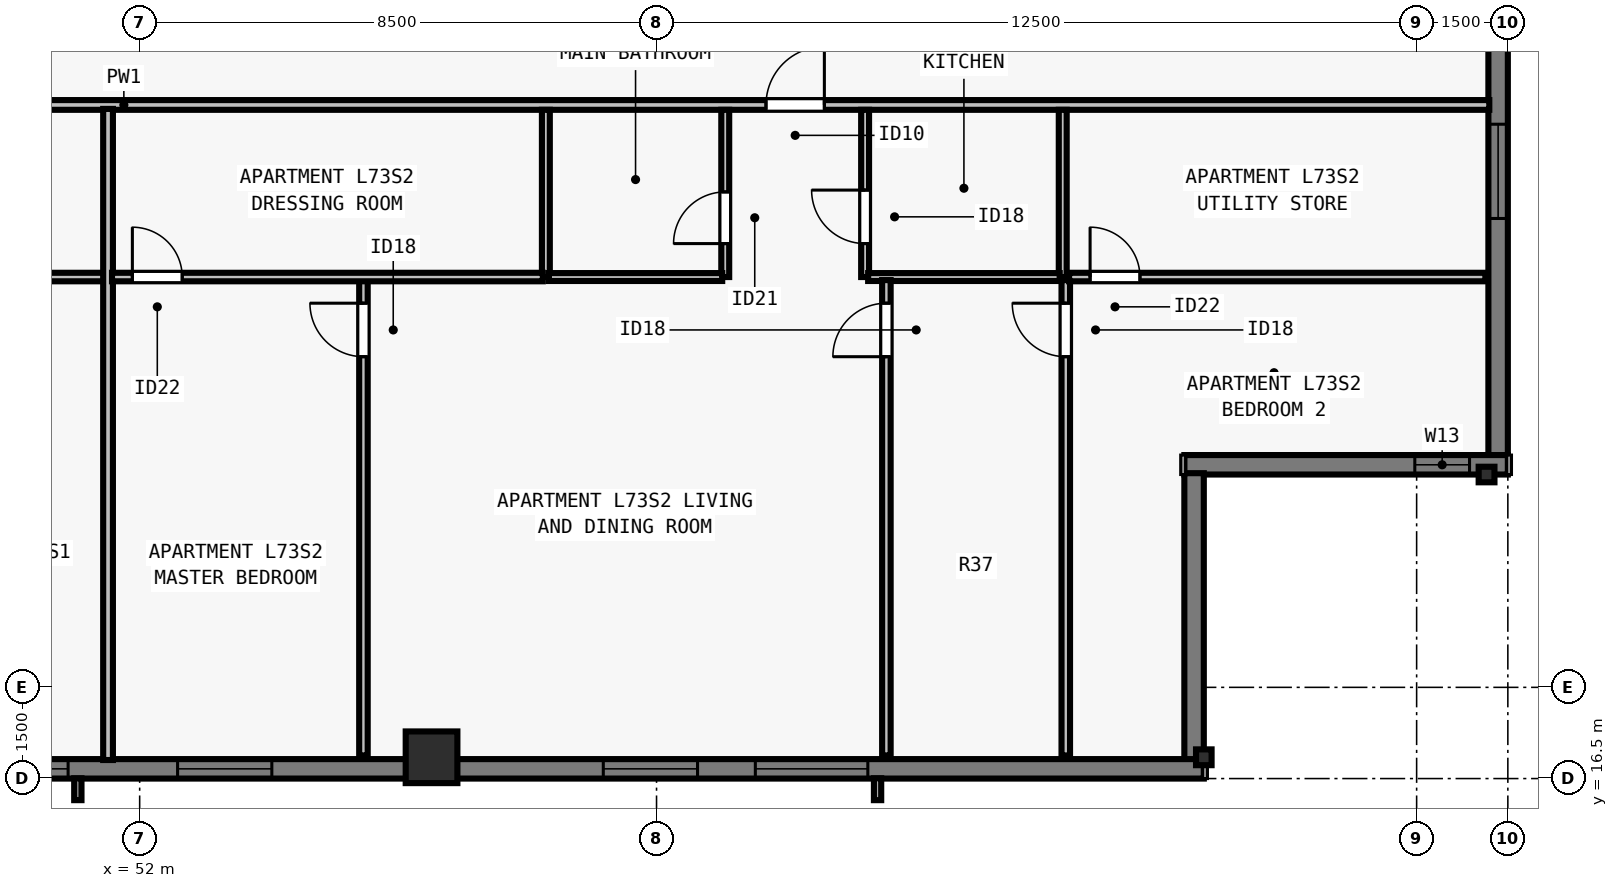
"""IFC4 building model, lengths in metres.
Left out: names, types, materials, properties, quantities, classifications, styles, units other than length and angle.
Written with IfcOpenShell. Run it as: python <this file> out.ifc"""

import sys

from ifc_helpers import new_model, si_unit, direction, frame, frame_2d, origin, origin_2d, place, context, subcontext, project, spatial, rectangle, i_section, extrude, element, fill, save


model = new_model("IFC4")
c1 = context("Model", 3, precision=1e-05, world=origin(), true_north=direction((0.0, 1.0)))
c2 = subcontext(c1, "Body", "Model", "MODEL_VIEW")
j1 = project(units=[si_unit("LENGTHUNIT", "METRE"), si_unit("PLANEANGLEUNIT", "RADIAN")], contexts=[c1])
p1 = place(None, origin())
s1 = spatial("IfcSite", under=j1, at=p1, CompositionType="ELEMENT")
p2 = place(p1, origin())
s2 = spatial("IfcBuilding", under=s1, at=p2, CompositionType="ELEMENT")
p3 = place(p2, frame((0.0, 0.0, 265.5)))
s3 = spatial("IfcBuildingStorey", under=s2, at=p3, CompositionType="ELEMENT", Elevation=265.5)
p4 = place(p3, frame((56.8, 16.85, 0.0), z_axis=(0.0, 0.0, 1.0), x_axis=(1.0, 0.0, 0.0)))
e1 = element("IfcColumn", 1, at=p4, inside=s3, PredefinedType="COLUMN", context=c2, shape_type="SweptSolid", body=[
    extrude(rectangle(XDim=0.85, YDim=0.85, at=origin_2d()), origin(), (0.0, 0.0, 1.0), 3.5),
])
for number, where, z_axis, x_axis in (
    (2, (69.5, 16.85, 0.0), (0.0, 0.0, 1.0), (1.0, 0.0, 0.0)),
    (3, (74.15, 21.5, 0.0), (0.0, 0.0, 1.0), (0.0, 1.0, 0.0)),
):
    element("IfcColumn", number, at=place(p3, frame(where, z_axis=z_axis, x_axis=x_axis)), inside=s3, PredefinedType="COLUMN", context=c2, shape_type="SweptSolid", body=[
        extrude(i_section(OverallWidth=0.256, OverallDepth=0.26, WebThickness=0.01, FlangeThickness=0.017, FilletRadius=0.013, at=origin_2d()), origin(), (0.0, 0.0, 1.0), 3.5),
    ])
p5 = place(p3, frame((74.34, 56.5, 0.0), z_axis=(0.0, 0.0, 1.0), x_axis=(0.0, -1.0, 0.0)))
e4 = element("IfcWall", 4, at=p5, inside=s3, PredefinedType="SOLIDWALL", context=c2, shape_type="SweptSolid", body=[
    extrude(rectangle(XDim=34.702, YDim=0.32, at=frame_2d((17.351, 0.0))), origin(), (0.0, 0.0, 1.0), 3.29),
])
p6 = place(p5, frame((6.888, 0.0, 0.8)))
e5 = element("IfcOpeningElement", 5, at=p6, cuts=e4, PredefinedType="OPENING", context=c2, shape_type="SweptSolid", body=[
    extrude(rectangle(XDim=1.55, YDim=1.678, at=frame_2d((0.775, 0.839))), frame((0.0, 0.17, 0.0), z_axis=(0.0, -1.0, 0.0), x_axis=(1.0, 0.0, 0.0)), (0.0, 0.0, 1.0), 0.34),
])
p7 = place(p5, frame((10.113, 0.0, 0.8)))
e6 = element("IfcOpeningElement", 6, at=p7, cuts=e4, PredefinedType="OPENING", context=c2, shape_type="SweptSolid", body=[
    extrude(rectangle(XDim=1.85, YDim=1.678, at=frame_2d((0.925, 0.839))), frame((0.0, 0.17, 0.0), z_axis=(0.0, -1.0, 0.0), x_axis=(1.0, 0.0, 0.0)), (0.0, 0.0, 1.0), 0.34),
])
p8 = place(p5, frame((14.038, 0.0, 0.8)))
e7 = element("IfcOpeningElement", 7, at=p8, cuts=e4, PredefinedType="OPENING", context=c2, shape_type="SweptSolid", body=[
    extrude(rectangle(XDim=1.55, YDim=1.678, at=frame_2d((0.775, 0.839))), frame((0.0, 0.17, 0.0), z_axis=(0.0, -1.0, 0.0), x_axis=(1.0, 0.0, 0.0)), (0.0, 0.0, 1.0), 0.34),
])
p9 = place(p5, frame((18.114, 0.0, 0.8)))
e8 = element("IfcOpeningElement", 8, at=p9, cuts=e4, PredefinedType="OPENING", context=c2, shape_type="SweptSolid", body=[
    extrude(rectangle(XDim=1.85, YDim=1.678, at=frame_2d((0.925, 0.839))), frame((0.0, 0.17, 0.0), z_axis=(0.0, -1.0, 0.0), x_axis=(1.0, 0.0, 0.0)), (0.0, 0.0, 1.0), 0.34),
])
p10 = place(p5, frame((23.614, 0.0, 0.8)))
e9 = element("IfcOpeningElement", 9, at=p10, cuts=e4, PredefinedType="OPENING", context=c2, shape_type="SweptSolid", body=[
    extrude(rectangle(XDim=1.85, YDim=1.678, at=frame_2d((0.925, 0.839))), frame((0.0, 0.17, 0.0), z_axis=(0.0, -1.0, 0.0), x_axis=(1.0, 0.0, 0.0)), (0.0, 0.0, 1.0), 0.34),
])
p11 = place(p5, frame((29.24, 0.0, 0.8)))
e10 = element("IfcOpeningElement", 10, at=p11, cuts=e4, PredefinedType="OPENING", context=c2, shape_type="SweptSolid", body=[
    extrude(rectangle(XDim=1.55, YDim=1.678, at=frame_2d((0.775, 0.839))), frame((0.0, 0.17, 0.0), z_axis=(0.0, -1.0, 0.0), x_axis=(1.0, 0.0, 0.0)), (0.0, 0.0, 1.0), 0.34),
])
p12 = place(p3, frame((74.5, 21.66, 0.0), z_axis=(0.0, 0.0, 1.0), x_axis=(-1.0, 0.0, 0.0)))
e11 = element("IfcWall", 11, at=p12, inside=s3, PredefinedType="SOLIDWALL", context=c2, shape_type="SweptSolid", body=[
    extrude(rectangle(XDim=5.32, YDim=0.32, at=frame_2d((2.66, 0.0))), origin(), (0.0, 0.0, 1.0), 3.29),
])
p13 = place(p12, frame((0.63, 0.0, 0.8)))
e12 = element("IfcOpeningElement", 12, at=p13, cuts=e11, PredefinedType="OPENING", context=c2, shape_type="SweptSolid", body=[
    extrude(rectangle(XDim=0.9, YDim=1.678, at=frame_2d((0.45, 0.839))), frame((0.0, 0.17, 0.0), z_axis=(0.0, -1.0, 0.0), x_axis=(1.0, 0.0, 0.0)), (0.0, 0.0, 1.0), 0.34),
])
p14 = place(p3, frame((69.34, 21.522, 0.0), z_axis=(0.0, 0.0, 1.0), x_axis=(0.0, -1.0, 0.0)))
e13 = element("IfcWall", 13, at=p14, inside=s3, PredefinedType="SOLIDWALL", context=c2, shape_type="SweptSolid", body=[
    extrude(rectangle(XDim=4.724, YDim=0.32, at=frame_2d((2.362, 0.0))), origin(), (0.0, 0.0, 1.0), 3.29),
])
p15 = place(p3, frame((69.5, 16.66, 0.0), z_axis=(0.0, 0.0, 1.0), x_axis=(-1.0, 0.0, 0.0)))
e14 = element("IfcWall", 14, at=p15, inside=s3, PredefinedType="SOLIDWALL", context=c2, shape_type="SweptSolid", body=[
    extrude(rectangle(XDim=22.602, YDim=0.32, at=frame_2d((11.301, 0.0))), origin(), (0.0, 0.0, 1.0), 3.29),
])
p16 = place(p15, frame((5.525, 0.0, 0.8)))
e15 = element("IfcOpeningElement", 15, at=p16, cuts=e14, PredefinedType="OPENING", context=c2, shape_type="SweptSolid", body=[
    extrude(rectangle(XDim=1.85, YDim=1.678, at=frame_2d((0.925, 0.839))), frame((0.0, 0.17, 0.0), z_axis=(0.0, -1.0, 0.0), x_axis=(1.0, 0.0, 0.0)), (0.0, 0.0, 1.0), 0.34),
])
p17 = place(p15, frame((8.326, 0.0, 0.8)))
e16 = element("IfcOpeningElement", 16, at=p17, cuts=e14, PredefinedType="OPENING", context=c2, shape_type="SweptSolid", body=[
    extrude(rectangle(XDim=1.55, YDim=1.678, at=frame_2d((0.775, 0.839))), frame((0.0, 0.17, 0.0), z_axis=(0.0, -1.0, 0.0), x_axis=(1.0, 0.0, 0.0)), (0.0, 0.0, 1.0), 0.34),
])
p18 = place(p15, frame((15.326, 0.0, 0.8)))
e17 = element("IfcOpeningElement", 17, at=p18, cuts=e14, PredefinedType="OPENING", context=c2, shape_type="SweptSolid", body=[
    extrude(rectangle(XDim=1.55, YDim=1.678, at=frame_2d((0.775, 0.839))), frame((0.0, 0.17, 0.0), z_axis=(0.0, -1.0, 0.0), x_axis=(1.0, 0.0, 0.0)), (0.0, 0.0, 1.0), 0.34),
])
p19 = place(p15, frame((18.677, 0.0, 0.8)))
e18 = element("IfcOpeningElement", 18, at=p19, cuts=e14, PredefinedType="OPENING", context=c2, shape_type="SweptSolid", body=[
    extrude(rectangle(XDim=1.85, YDim=1.678, at=frame_2d((0.925, 0.839))), frame((0.0, 0.17, 0.0), z_axis=(0.0, -1.0, 0.0), x_axis=(1.0, 0.0, 0.0)), (0.0, 0.0, 1.0), 0.34),
])
p20 = place(p3, frame((29.805, 27.577, 0.0), z_axis=(0.0, 0.0, 1.0), x_axis=(1.0, 0.0, 0.0)))
e19 = element("IfcWall", 19, at=p20, inside=s3, PredefinedType="PARTITIONING", context=c2, shape_type="SweptSolid", body=[
    extrude(rectangle(XDim=44.39, YDim=0.16, at=frame_2d((22.195, 0.0))), origin(), (0.0, 0.0, 1.0), 2.958),
])
p21 = place(p20, frame((10.415, 0.0, 0.0)))
e20 = element("IfcOpeningElement", 20, at=p21, cuts=e19, PredefinedType="OPENING", context=c2, shape_type="SweptSolid", body=[
    extrude(rectangle(XDim=0.96, YDim=2.18, at=frame_2d((0.48, 1.09))), frame((0.0, 0.09, 0.0), z_axis=(0.0, -1.0, 0.0), x_axis=(1.0, 0.0, 0.0)), (0.0, 0.0, 1.0), 0.18),
])
p22 = place(p20, frame((32.495, 0.0, 0.0)))
e21 = element("IfcOpeningElement", 21, at=p22, cuts=e19, PredefinedType="OPENING", context=c2, shape_type="SweptSolid", body=[
    extrude(rectangle(XDim=0.96, YDim=2.18, at=frame_2d((0.48, 1.09))), frame((0.0, 0.09, 0.0), z_axis=(0.0, -1.0, 0.0), x_axis=(1.0, 0.0, 0.0)), (0.0, 0.0, 1.0), 0.18),
])
p23 = place(p3, frame((45.15, 24.748, 0.0), z_axis=(0.0, 0.0, 1.0), x_axis=(1.0, 0.0, 0.0)))
e22 = element("IfcWall", 22, at=p23, inside=s3, PredefinedType="PARTITIONING", context=c2, shape_type="SweptSolid", body=[
    extrude(rectangle(XDim=6.38, YDim=0.14, at=frame_2d((3.19, 0.0))), origin(), (0.0, 0.0, 1.0), 3.29),
])
p24 = place(p23, frame((0.4, 0.0, 0.0)))
e23 = element("IfcOpeningElement", 23, at=p24, cuts=e22, PredefinedType="OPENING", context=c2, shape_type="SweptSolid", body=[
    extrude(rectangle(XDim=0.82, YDim=2.1, at=frame_2d((0.41, 1.05))), frame((0.0, 0.08, 0.0), z_axis=(0.0, -1.0, 0.0), x_axis=(1.0, 0.0, 0.0)), (0.0, 0.0, 1.0), 0.16),
])
p25 = place(p3, frame((51.48, 16.805, 0.0), z_axis=(0.0, 0.0, 1.0), x_axis=(0.0, 1.0, 0.0)))
e24 = element("IfcWall", 24, at=p25, inside=s3, PredefinedType="PARTITIONING", context=c2, shape_type="SweptSolid", body=[
    extrude(rectangle(XDim=10.708, YDim=0.16, at=frame_2d((5.354, 0.0))), origin(), (0.0, 0.0, 1.0), 2.958),
])
p26 = place(p3, frame((58.68, 24.748, 0.0), z_axis=(0.0, 0.0, 1.0), x_axis=(0.0, 1.0, 0.0)))
e25 = element("IfcWall", 25, at=p26, inside=s3, PredefinedType="PLUMBINGWALL", context=c2, shape_type="SweptSolid", body=[
    extrude(rectangle(XDim=2.75, YDim=0.13, at=frame_2d((1.375, 0.0))), origin(), (0.0, 0.0, 1.0), 3.29),
])
p27 = place(p3, frame((61.63, 24.748, 0.0), z_axis=(0.0, 0.0, 1.0), x_axis=(0.0, 1.0, 0.0)))
e26 = element("IfcWall", 26, at=p27, inside=s3, PredefinedType="PLUMBINGWALL", context=c2, shape_type="SweptSolid", body=[
    extrude(rectangle(XDim=2.75, YDim=0.13, at=frame_2d((1.375, 0.0))), origin(), (0.0, 0.0, 1.0), 3.29),
])
p28 = place(p27, frame((0.55, 0.0, 0.0)))
e27 = element("IfcOpeningElement", 27, at=p28, cuts=e26, PredefinedType="OPENING", context=c2, shape_type="SweptSolid", body=[
    extrude(rectangle(XDim=0.85, YDim=2.08, at=frame_2d((0.425, 1.04))), frame((0.0, 0.075, 0.0), z_axis=(0.0, -1.0, 0.0), x_axis=(1.0, 0.0, 0.0)), (0.0, 0.0, 1.0), 0.15),
])
p29 = place(p3, frame((58.73, 24.748, 0.0), z_axis=(0.0, 0.0, 1.0), x_axis=(1.0, 0.0, 0.0)))
e28 = element("IfcWall", 28, at=p29, inside=s3, PredefinedType="PLUMBINGWALL", context=c2, shape_type="SweptSolid", body=[
    extrude(rectangle(XDim=2.85, YDim=0.13, at=frame_2d((1.425, 0.0))), origin(), (0.0, 0.0, 1.0), 3.29),
])
p30 = place(p3, frame((67.18, 24.748, 0.0), z_axis=(0.0, 0.0, 1.0), x_axis=(0.0, 1.0, 0.0)))
e29 = element("IfcWall", 29, at=p30, inside=s3, PredefinedType="PLUMBINGWALL", context=c2, shape_type="SweptSolid", body=[
    extrude(rectangle(XDim=2.75, YDim=0.13, at=frame_2d((1.375, 0.0))), origin(), (0.0, 0.0, 1.0), 3.29),
])
p31 = place(p3, frame((63.93, 24.748, 0.0), z_axis=(0.0, 0.0, 1.0), x_axis=(0.0, 1.0, 0.0)))
e30 = element("IfcWall", 30, at=p31, inside=s3, PredefinedType="PLUMBINGWALL", context=c2, shape_type="SweptSolid", body=[
    extrude(rectangle(XDim=2.75, YDim=0.13, at=frame_2d((1.375, 0.0))), origin(), (0.0, 0.0, 1.0), 2.573),
])
p32 = place(p31, frame((0.55, 0.0, 0.0)))
e31 = element("IfcOpeningElement", 31, at=p32, cuts=e30, PredefinedType="OPENING", context=c2, shape_type="SweptSolid", body=[
    extrude(rectangle(XDim=0.88, YDim=2.1, at=frame_2d((0.44, 1.05))), frame((0.0, 0.075, 0.0), z_axis=(0.0, -1.0, 0.0), x_axis=(1.0, 0.0, 0.0)), (0.0, 0.0, 1.0), 0.15),
])
p33 = place(p3, frame((63.98, 24.748, 0.0), z_axis=(0.0, 0.0, 1.0), x_axis=(1.0, 0.0, 0.0)))
e32 = element("IfcWall", 32, at=p33, inside=s3, PredefinedType="PLUMBINGWALL", context=c2, shape_type="SweptSolid", body=[
    extrude(rectangle(XDim=3.15, YDim=0.13, at=frame_2d((1.575, 0.0))), origin(), (0.0, 0.0, 1.0), 3.29),
])
p34 = place(p3, frame((55.68, 16.88, 0.0), z_axis=(0.0, 0.0, 1.0), x_axis=(0.0, 1.0, 0.0)))
e33 = element("IfcWall", 33, at=p34, inside=s3, PredefinedType="PARTITIONING", context=c2, shape_type="SweptSolid", body=[
    extrude(rectangle(XDim=7.908, YDim=0.14, at=frame_2d((3.954, 0.0))), origin(), (0.0, 0.0, 1.0), 3.29),
])
p35 = place(p34, frame((6.558, 0.0, 0.0)))
e34 = element("IfcOpeningElement", 34, at=p35, cuts=e33, PredefinedType="OPENING", context=c2, shape_type="SweptSolid", body=[
    extrude(rectangle(XDim=0.88, YDim=2.1, at=frame_2d((0.44, 1.05))), frame((0.0, 0.08, 0.0), z_axis=(0.0, -1.0, 0.0), x_axis=(1.0, 0.0, 0.0)), (0.0, 0.0, 1.0), 0.16),
])
p36 = place(p3, frame((51.545, 24.748, 0.0), z_axis=(0.0, 0.0, 1.0), x_axis=(1.0, 0.0, 0.0)))
e35 = element("IfcWall", 35, at=p36, inside=s3, PredefinedType="PARTITIONING", context=c2, shape_type="SweptSolid", body=[
    extrude(rectangle(XDim=7.085, YDim=0.14, at=frame_2d((3.542, 0.0))), origin(), (0.0, 0.0, 1.0), 3.29),
])
p37 = place(p36, frame((0.335, 0.0, 0.0)))
e36 = element("IfcOpeningElement", 36, at=p37, cuts=e35, PredefinedType="OPENING", context=c2, shape_type="SweptSolid", body=[
    extrude(rectangle(XDim=0.82, YDim=2.1, at=frame_2d((0.41, 1.05))), frame((0.0, 0.08, 0.0), z_axis=(0.0, -1.0, 0.0), x_axis=(1.0, 0.0, 0.0)), (0.0, 0.0, 1.0), 0.16),
])
p38 = place(p3, frame((67.23, 16.88, 0.0), z_axis=(0.0, 0.0, 1.0), x_axis=(0.0, 1.0, 0.0)))
e37 = element("IfcWall", 37, at=p38, inside=s3, PredefinedType="PARTITIONING", context=c2, shape_type="SweptSolid", body=[
    extrude(rectangle(XDim=7.818, YDim=0.14, at=frame_2d((3.909, 0.0))), origin(), (0.0, 0.0, 1.0), 2.573),
])
p39 = place(p38, frame((6.558, 0.0, 0.0)))
e38 = element("IfcOpeningElement", 38, at=p39, cuts=e37, PredefinedType="OPENING", context=c2, shape_type="SweptSolid", body=[
    extrude(rectangle(XDim=0.88, YDim=2.1, at=frame_2d((0.44, 1.05))), frame((0.0, 0.08, 0.0), z_axis=(0.0, -1.0, 0.0), x_axis=(1.0, 0.0, 0.0)), (0.0, 0.0, 1.0), 0.16),
])
p40 = place(p3, frame((67.285, 24.748, 0.0), z_axis=(0.0, 0.0, 1.0), x_axis=(1.0, 0.0, 0.0)))
e39 = element("IfcWall", 39, at=p40, inside=s3, PredefinedType="PARTITIONING", context=c2, shape_type="SweptSolid", body=[
    extrude(rectangle(XDim=6.845, YDim=0.14, at=frame_2d((3.422, 0.0))), origin(), (0.0, 0.0, 1.0), 2.958),
])
p41 = place(p40, frame((0.345, 0.0, 0.0)))
e40 = element("IfcOpeningElement", 40, at=p41, cuts=e39, PredefinedType="OPENING", context=c2, shape_type="SweptSolid", body=[
    extrude(rectangle(XDim=0.82, YDim=2.1, at=frame_2d((0.41, 1.05))), frame((0.0, 0.08, 0.0), z_axis=(0.0, -1.0, 0.0), x_axis=(1.0, 0.0, 0.0)), (0.0, 0.0, 1.0), 0.16),
])
p42 = place(p3, frame((64.28, 16.88, 0.0), z_axis=(0.0, 0.0, 1.0), x_axis=(0.0, 1.0, 0.0)))
e41 = element("IfcWall", 41, at=p42, inside=s3, PredefinedType="PARTITIONING", context=c2, shape_type="SweptSolid", body=[
    extrude(rectangle(XDim=7.818, YDim=0.14, at=frame_2d((3.909, 0.0))), origin(), (0.0, 0.0, 1.0), 2.573),
])
p43 = place(p42, frame((6.558, 0.0, 0.0)))
e42 = element("IfcOpeningElement", 42, at=p43, cuts=e41, PredefinedType="OPENING", context=c2, shape_type="SweptSolid", body=[
    extrude(rectangle(XDim=0.88, YDim=2.1, at=frame_2d((0.44, 1.05))), frame((0.0, 0.08, 0.0), z_axis=(0.0, -1.0, 0.0), x_axis=(1.0, 0.0, 0.0)), (0.0, 0.0, 1.0), 0.16),
])
p44 = place(p11, origin())
e43 = element("IfcWindow", 43, at=p44, inside=s3, PartitioningType="SINGLE_PANEL", PredefinedType="WINDOW", context=c2, shape_type="SweptSolid", body=[
    extrude(rectangle(XDim=1.55, YDim=1.678, at=frame_2d((0.775, 0.839))), frame((0.0, -0.05, 0.0), z_axis=(0.0, -1.0, 0.0), x_axis=(1.0, 0.0, 0.0)), (0.0, 0.0, 1.0), 0.06),
])
fill(e10, e43)
p45 = place(p16, origin())
e44 = element("IfcWindow", 44, at=p45, inside=s3, PartitioningType="SINGLE_PANEL", PredefinedType="WINDOW", context=c2, shape_type="SweptSolid", body=[
    extrude(rectangle(XDim=1.85, YDim=1.678, at=frame_2d((0.925, 0.839))), frame((0.0, -0.05, 0.0), z_axis=(0.0, -1.0, 0.0), x_axis=(1.0, 0.0, 0.0)), (0.0, 0.0, 1.0), 0.06),
])
fill(e15, e44)
p46 = place(p17, origin())
e45 = element("IfcWindow", 45, at=p46, inside=s3, PartitioningType="SINGLE_PANEL", PredefinedType="WINDOW", context=c2, shape_type="SweptSolid", body=[
    extrude(rectangle(XDim=1.55, YDim=1.678, at=frame_2d((0.775, 0.839))), frame((0.0, -0.05, 0.0), z_axis=(0.0, -1.0, 0.0), x_axis=(1.0, 0.0, 0.0)), (0.0, 0.0, 1.0), 0.06),
])
fill(e16, e45)
p47 = place(p18, origin())
e46 = element("IfcWindow", 46, at=p47, inside=s3, PartitioningType="SINGLE_PANEL", PredefinedType="WINDOW", context=c2, shape_type="SweptSolid", body=[
    extrude(rectangle(XDim=1.55, YDim=1.678, at=frame_2d((0.775, 0.839))), frame((0.0, -0.05, 0.0), z_axis=(0.0, -1.0, 0.0), x_axis=(1.0, 0.0, 0.0)), (0.0, 0.0, 1.0), 0.06),
])
fill(e17, e46)
p48 = place(p19, origin())
e47 = element("IfcWindow", 47, at=p48, inside=s3, PartitioningType="SINGLE_PANEL", PredefinedType="WINDOW", context=c2, shape_type="SweptSolid", body=[
    extrude(rectangle(XDim=1.85, YDim=1.678, at=frame_2d((0.925, 0.839))), frame((0.0, -0.05, 0.0), z_axis=(0.0, -1.0, 0.0), x_axis=(1.0, 0.0, 0.0)), (0.0, 0.0, 1.0), 0.06),
])
fill(e18, e47)
p49 = place(p13, origin())
e48 = element("IfcWindow", 48, at=p49, inside=s3, PartitioningType="SINGLE_PANEL", PredefinedType="WINDOW", context=c2, shape_type="SweptSolid", body=[
    extrude(rectangle(XDim=0.9, YDim=1.678, at=frame_2d((0.45, 0.839))), frame((0.0, -0.04, 0.0), z_axis=(0.0, -1.0, 0.0), x_axis=(1.0, 0.0, 0.0)), (0.0, 0.0, 1.0), 0.06),
])
fill(e12, e48)
p50 = place(p28, origin())
e49 = element("IfcDoor", 49, at=p50, inside=s3, OperationType="SINGLE_SWING_LEFT", PredefinedType="DOOR", context=c2, shape_type="SweptSolid", body=[
    extrude(rectangle(XDim=0.85, YDim=2.08, at=frame_2d((0.425, 1.04))), frame((0.0, 0.025, 0.0), z_axis=(0.0, -1.0, 0.0), x_axis=(1.0, 0.0, 0.0)), (0.0, 0.0, 1.0), 0.05),
])
fill(e27, e49)
p51 = place(p32, origin())
e50 = element("IfcDoor", 50, at=p51, inside=s3, OperationType="SINGLE_SWING_RIGHT", PredefinedType="DOOR", context=c2, shape_type="SweptSolid", body=[
    extrude(rectangle(XDim=0.88, YDim=2.1, at=frame_2d((0.44, 1.05))), frame((0.0, 0.025, 0.0), z_axis=(0.0, -1.0, 0.0), x_axis=(1.0, 0.0, 0.0)), (0.0, 0.0, 1.0), 0.05),
])
fill(e31, e50)
p52 = place(p37, origin())
e51 = element("IfcDoor", 51, at=p52, inside=s3, OperationType="SINGLE_SWING_LEFT", PredefinedType="DOOR", context=c2, shape_type="SweptSolid", body=[
    extrude(rectangle(XDim=0.82, YDim=2.1, at=frame_2d((0.41, 1.05))), frame((0.0, 0.025, 0.0), z_axis=(0.0, -1.0, 0.0), x_axis=(1.0, 0.0, 0.0)), (0.0, 0.0, 1.0), 0.05),
])
fill(e36, e51)
p53 = place(p35, origin())
e52 = element("IfcDoor", 52, at=p53, inside=s3, OperationType="SINGLE_SWING_RIGHT", PredefinedType="DOOR", context=c2, shape_type="SweptSolid", body=[
    extrude(rectangle(XDim=0.88, YDim=2.1, at=frame_2d((0.44, 1.05))), frame((0.0, 0.025, 0.0), z_axis=(0.0, -1.0, 0.0), x_axis=(1.0, 0.0, 0.0)), (0.0, 0.0, 1.0), 0.05),
])
fill(e34, e52)
p54 = place(p41, origin())
e53 = element("IfcDoor", 53, at=p54, inside=s3, OperationType="SINGLE_SWING_LEFT", PredefinedType="DOOR", context=c2, shape_type="SweptSolid", body=[
    extrude(rectangle(XDim=0.82, YDim=2.1, at=frame_2d((0.41, 1.05))), frame((0.0, 0.025, 0.0), z_axis=(0.0, -1.0, 0.0), x_axis=(1.0, 0.0, 0.0)), (0.0, 0.0, 1.0), 0.05),
])
fill(e40, e53)
p55 = place(p39, origin())
e54 = element("IfcDoor", 54, at=p55, inside=s3, OperationType="SINGLE_SWING_RIGHT", PredefinedType="DOOR", context=c2, shape_type="SweptSolid", body=[
    extrude(rectangle(XDim=0.88, YDim=2.1, at=frame_2d((0.44, 1.05))), frame((0.0, 0.025, 0.0), z_axis=(0.0, -1.0, 0.0), x_axis=(1.0, 0.0, 0.0)), (0.0, 0.0, 1.0), 0.05),
])
fill(e38, e54)
p56 = place(p43, origin())
e55 = element("IfcDoor", 55, at=p56, inside=s3, OperationType="SINGLE_SWING_LEFT", PredefinedType="DOOR", context=c2, shape_type="SweptSolid", body=[
    extrude(rectangle(XDim=0.88, YDim=2.1, at=frame_2d((0.44, 1.05))), frame((0.0, 0.025, 0.0), z_axis=(0.0, -1.0, 0.0), x_axis=(1.0, 0.0, 0.0)), (0.0, 0.0, 1.0), 0.05),
])
fill(e42, e55)
p57 = place(p22, origin())
e56 = element("IfcDoor", 56, at=p57, inside=s3, OperationType="SINGLE_SWING_RIGHT", PredefinedType="DOOR", context=c2, shape_type="SweptSolid", body=[
    extrude(rectangle(XDim=0.96, YDim=2.18, at=frame_2d((0.48, 1.09))), frame((0.0, 0.025, 0.0), z_axis=(0.0, -1.0, 0.0), x_axis=(1.0, 0.0, 0.0)), (0.0, 0.0, 1.0), 0.05),
])
fill(e21, e56)
save(model, sys.argv[1])
